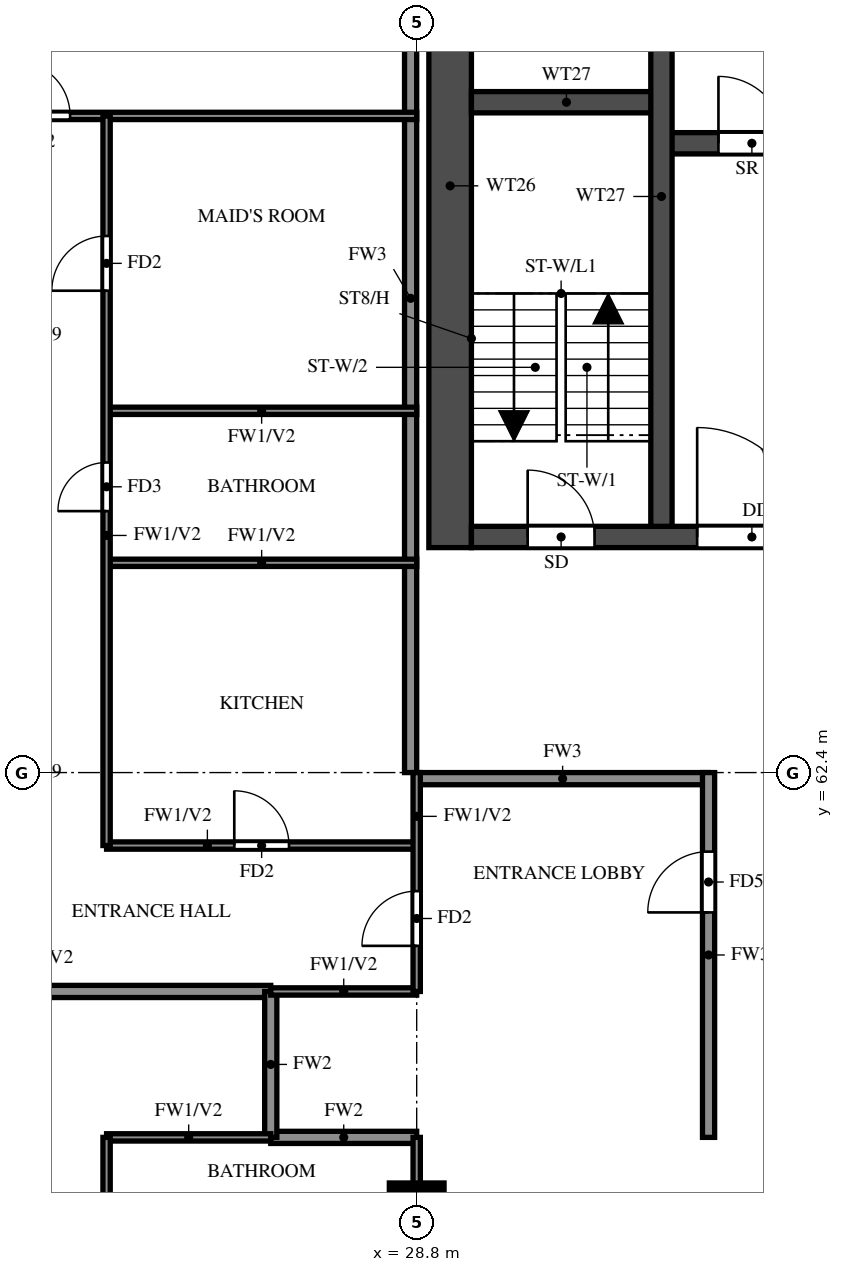
"""IFC4 building model, lengths in metres.
Left out: names, types, materials, properties, quantities, classifications, styles, units other than length and angle.
Written with IfcOpenShell. Run it as: python <this file> out.ifc"""

import sys

from ifc_helpers import new_model, si_unit, direction, frame, frame_2d, origin, origin_2d, place, context, subcontext, project, spatial, rectangle, extrude, source, transform, mapped, element, fill, save


model = new_model("IFC4")
c1 = context("Model", 3, precision=1e-05, world=origin(), true_north=direction((0.0, 1.0)))
c2 = subcontext(c1, "Body", "Model", "MODEL_VIEW")
j1 = project(units=[si_unit("LENGTHUNIT", "METRE"), si_unit("PLANEANGLEUNIT", "RADIAN")], contexts=[c1])
p1 = place(None, origin())
s1 = spatial("IfcSite", under=j1, at=p1, CompositionType="ELEMENT")
p2 = place(p1, origin())
s2 = spatial("IfcBuilding", under=s1, at=p2, CompositionType="ELEMENT")
p3 = place(p2, frame((0.0, 0.0, 192.0)))
s3 = spatial("IfcBuildingStorey", under=s2, at=p3, CompositionType="ELEMENT", Elevation=192.0)
m1 = source(origin(), c2, "Body", "SweptSolid", [
    extrude(rectangle(XDim=0.9, YDim=0.9, at=origin_2d()), origin(), (0.0, 0.0, 1.0), 3.2),
])
p4 = place(p3, frame((28.8, 55.2, 0.0), z_axis=(0.0, 0.0, 1.0), x_axis=(1.0, 0.0, 0.0)))
e1 = element("IfcColumn", 1, at=p4, inside=s3, PredefinedType="COLUMN", context=c2, shape_type="MappedRepresentation", body=[
    mapped(m1, transform((0.0, 0.0, 0.0))),
])
p5 = place(p3, frame((29.35, 66.1, 0.0), z_axis=(0.0, 0.0, 1.0), x_axis=(0.0, 1.0, 0.0)))
e2 = element("IfcWall", 2, at=p5, inside=s3, PredefinedType="SHEAR", context=c2, shape_type="SweptSolid", body=[
    extrude(rectangle(XDim=11.9, YDim=0.7, at=frame_2d((5.95, 0.0))), origin(), (0.0, 0.0, 1.0), 3.2),
])
p6 = place(p3, frame((29.7, 66.275, 0.0), z_axis=(0.0, 0.0, 1.0), x_axis=(1.0, 0.0, 0.0)))
e3 = element("IfcWall", 3, at=p6, inside=s3, PredefinedType="SHEAR", context=c2, shape_type="SweptSolid", body=[
    extrude(rectangle(XDim=41.4, YDim=0.35, at=frame_2d((20.7, 0.0))), origin(), (0.0, 0.0, 1.0), 3.2),
])
p7 = place(p6, frame((0.925, 0.0, 0.0)))
e4 = element("IfcOpeningElement", 4, at=p7, cuts=e3, PredefinedType="OPENING", context=c2, shape_type="SweptSolid", body=[
    extrude(rectangle(XDim=1.1, YDim=2.1, at=frame_2d((0.55, 1.05))), frame((0.0, 0.185, 0.0), z_axis=(0.0, -1.0, 0.0), x_axis=(1.0, 0.0, 0.0)), (0.0, 0.0, 1.0), 0.37),
])
p8 = place(p6, frame((3.712, 0.0, 0.0)))
e5 = element("IfcOpeningElement", 5, at=p8, cuts=e3, PredefinedType="OPENING", context=c2, shape_type="SweptSolid", body=[
    extrude(rectangle(XDim=1.8, YDim=2.1, at=frame_2d((0.9, 1.05))), frame((0.0, 0.185, 0.0), z_axis=(0.0, -1.0, 0.0), x_axis=(1.0, 0.0, 0.0)), (0.0, 0.0, 1.0), 0.37),
])
p9 = place(p3, frame((32.825, 72.75, 0.0), z_axis=(0.0, 0.0, 1.0), x_axis=(1.0, 0.0, 0.0)))
e6 = element("IfcWall", 6, at=p9, inside=s3, PredefinedType="SHEAR", context=c2, shape_type="SweptSolid", body=[
    extrude(rectangle(XDim=35.15, YDim=0.35, at=frame_2d((17.575, 0.0))), origin(), (0.0, 0.0, 1.0), 3.2),
])
p10 = place(p9, frame((19.8, 0.0, 0.0)))
e7 = element("IfcOpeningElement", 7, at=p10, cuts=e6, PredefinedType="OPENING", context=c2, shape_type="SweptSolid", body=[
    extrude(rectangle(XDim=1.1, YDim=2.1, at=frame_2d((0.55, 1.05))), frame((0.0, 0.185, 0.0), z_axis=(0.0, -1.0, 0.0), x_axis=(1.0, 0.0, 0.0)), (0.0, 0.0, 1.0), 0.37),
])
p11 = place(p9, frame((27.7, 0.0, 0.0)))
e8 = element("IfcOpeningElement", 8, at=p11, cuts=e6, PredefinedType="OPENING", context=c2, shape_type="SweptSolid", body=[
    extrude(rectangle(XDim=1.1, YDim=2.1, at=frame_2d((0.55, 1.05))), frame((0.0, 0.185, 0.0), z_axis=(0.0, -1.0, 0.0), x_axis=(1.0, 0.0, 0.0)), (0.0, 0.0, 1.0), 0.37),
])
p12 = place(p9, frame((30.3, 0.0, 0.0)))
e9 = element("IfcOpeningElement", 9, at=p12, cuts=e6, PredefinedType="OPENING", context=c2, shape_type="SweptSolid", body=[
    extrude(rectangle(XDim=1.1, YDim=2.1, at=frame_2d((0.55, 1.05))), frame((0.0, 0.185, 0.0), z_axis=(0.0, -1.0, 0.0), x_axis=(1.0, 0.0, 0.0)), (0.0, 0.0, 1.0), 0.37),
])
p13 = place(p9, frame((3.8, 0.0, 0.0)))
e10 = element("IfcOpeningElement", 10, at=p13, cuts=e6, PredefinedType="OPENING", context=c2, shape_type="SweptSolid", body=[
    extrude(rectangle(XDim=1.1, YDim=2.1, at=frame_2d((0.55, 1.05))), frame((0.0, 0.185, 0.0), z_axis=(0.0, -1.0, 0.0), x_axis=(1.0, 0.0, 0.0)), (0.0, 0.0, 1.0), 0.37),
])
p14 = place(p9, frame((6.55, 0.0, 0.0)))
e11 = element("IfcOpeningElement", 11, at=p14, cuts=e6, PredefinedType="OPENING", context=c2, shape_type="SweptSolid", body=[
    extrude(rectangle(XDim=1.1, YDim=2.1, at=frame_2d((0.55, 1.05))), frame((0.0, 0.185, 0.0), z_axis=(0.0, -1.0, 0.0), x_axis=(1.0, 0.0, 0.0)), (0.0, 0.0, 1.0), 0.37),
])
p15 = place(p9, frame((9.3, 0.0, 0.0)))
e12 = element("IfcOpeningElement", 12, at=p15, cuts=e6, PredefinedType="OPENING", context=c2, shape_type="SweptSolid", body=[
    extrude(rectangle(XDim=1.1, YDim=2.1, at=frame_2d((0.55, 1.05))), frame((0.0, 0.185, 0.0), z_axis=(0.0, -1.0, 0.0), x_axis=(1.0, 0.0, 0.0)), (0.0, 0.0, 1.0), 0.37),
])
p16 = place(p9, frame((12.05, 0.0, 0.0)))
e13 = element("IfcOpeningElement", 13, at=p16, cuts=e6, PredefinedType="OPENING", context=c2, shape_type="SweptSolid", body=[
    extrude(rectangle(XDim=1.1, YDim=2.1, at=frame_2d((0.55, 1.05))), frame((0.0, 0.185, 0.0), z_axis=(0.0, -1.0, 0.0), x_axis=(1.0, 0.0, 0.0)), (0.0, 0.0, 1.0), 0.37),
])
p17 = place(p9, frame((14.8, 0.0, 0.0)))
e14 = element("IfcOpeningElement", 14, at=p17, cuts=e6, PredefinedType="OPENING", context=c2, shape_type="SweptSolid", body=[
    extrude(rectangle(XDim=1.1, YDim=2.1, at=frame_2d((0.55, 1.05))), frame((0.0, 0.185, 0.0), z_axis=(0.0, -1.0, 0.0), x_axis=(1.0, 0.0, 0.0)), (0.0, 0.0, 1.0), 0.37),
])
p18 = place(p9, frame((17.55, 0.0, 0.0)))
e15 = element("IfcOpeningElement", 15, at=p18, cuts=e6, PredefinedType="OPENING", context=c2, shape_type="SweptSolid", body=[
    extrude(rectangle(XDim=1.1, YDim=2.1, at=frame_2d((0.55, 1.05))), frame((0.0, 0.185, 0.0), z_axis=(0.0, -1.0, 0.0), x_axis=(1.0, 0.0, 0.0)), (0.0, 0.0, 1.0), 0.37),
])
p19 = place(p9, frame((0.938, 0.0, 0.0)))
e16 = element("IfcOpeningElement", 16, at=p19, cuts=e6, PredefinedType="OPENING", context=c2, shape_type="SweptSolid", body=[
    extrude(rectangle(XDim=1.1, YDim=2.1, at=frame_2d((0.55, 1.05))), frame((0.0, 0.185, 0.0), z_axis=(0.0, -1.0, 0.0), x_axis=(1.0, 0.0, 0.0)), (0.0, 0.0, 1.0), 0.37),
])
p20 = place(p3, frame((29.7, 73.425, 0.0), z_axis=(0.0, 0.0, 1.0), x_axis=(1.0, 0.0, 0.0)))
e17 = element("IfcWall", 17, at=p20, inside=s3, PredefinedType="SHEAR", context=c2, shape_type="SweptSolid", body=[
    extrude(rectangle(XDim=3.125, YDim=0.35, at=frame_2d((1.562, 0.0))), origin(), (0.0, 0.0, 1.0), 3.2),
])
p21 = place(p3, frame((32.825, 66.45, 0.0), z_axis=(0.0, 0.0, 1.0), x_axis=(0.0, 1.0, 0.0)))
e18 = element("IfcWall", 18, at=p21, inside=s3, PredefinedType="SHEAR", context=c2, shape_type="SweptSolid", body=[
    extrude(rectangle(XDim=10.85, YDim=0.35, at=frame_2d((5.425, 0.0))), origin(), (0.0, 0.0, 1.0), 3.2),
])
p22 = place(p3, frame((28.8, 62.3, 0.0), z_axis=(0.0, 0.0, 1.0), x_axis=(1.0, 0.0, 0.0)))
e19 = element("IfcWall", 19, at=p22, inside=s3, PredefinedType="SOLIDWALL", context=c2, shape_type="SweptSolid", body=[
    extrude(rectangle(XDim=4.8, YDim=0.2, at=frame_2d((2.4, 0.0))), origin(), (0.0, 0.0, 1.0), 3.2),
])
p23 = place(p3, frame((28.7, 62.4, 0.0), z_axis=(0.0, 0.0, 1.0), x_axis=(0.0, 1.0, 0.0)))
e20 = element("IfcWall", 20, at=p23, inside=s3, PredefinedType="SOLIDWALL", context=c2, shape_type="SweptSolid", body=[
    extrude(rectangle(XDim=15.6, YDim=0.2, at=frame_2d((7.8, 0.0))), origin(), (0.0, 0.0, 1.0), 3.2),
])
p24 = place(p3, frame((33.6, 56.4, 0.0), z_axis=(0.0, 0.0, 1.0), x_axis=(0.0, 1.0, 0.0)))
e21 = element("IfcWall", 21, at=p24, inside=s3, PredefinedType="SOLIDWALL", context=c2, shape_type="SweptSolid", body=[
    extrude(rectangle(XDim=6.0, YDim=0.2, at=frame_2d((3.0, 0.0))), origin(), (0.0, 0.0, 1.0), 3.2),
])
p25 = place(p24, frame((3.7, 0.0, 0.0)))
e22 = element("IfcOpeningElement", 22, at=p25, cuts=e21, PredefinedType="OPENING", context=c2, shape_type="SweptSolid", body=[
    extrude(rectangle(XDim=1.0, YDim=2.1, at=frame_2d((0.5, 1.05))), frame((0.0, 0.11, 0.0), z_axis=(0.0, -1.0, 0.0), x_axis=(1.0, 0.0, 0.0)), (0.0, 0.0, 1.0), 0.22),
])
p26 = place(p3, frame((26.4, 56.4, 0.0), z_axis=(0.0, 0.0, 1.0), x_axis=(1.0, 0.0, 0.0)))
e23 = element("IfcWall", 23, at=p26, inside=s3, PredefinedType="SOLIDWALL", context=c2, shape_type="SweptSolid", body=[
    extrude(rectangle(XDim=2.4, YDim=0.2, at=frame_2d((1.2, 0.0))), origin(), (0.0, 0.0, 1.0), 3.2),
])
p27 = place(p3, frame((14.525, 58.8, 0.0), z_axis=(0.0, 0.0, 1.0), x_axis=(1.0, 0.0, 0.0)))
e24 = element("IfcWall", 24, at=p27, inside=s3, PredefinedType="SOLIDWALL", context=c2, shape_type="SweptSolid", body=[
    extrude(rectangle(XDim=11.875, YDim=0.2, at=frame_2d((5.938, 0.0))), origin(), (0.0, 0.0, 1.0), 2.3),
])
p28 = place(p3, frame((26.4, 56.4, 0.0), z_axis=(0.0, 0.0, 1.0), x_axis=(0.0, 1.0, 0.0)))
e25 = element("IfcWall", 25, at=p28, inside=s3, PredefinedType="SOLIDWALL", context=c2, shape_type="SweptSolid", body=[
    extrude(rectangle(XDim=2.4, YDim=0.2, at=frame_2d((1.2, 0.0))), origin(), (0.0, 0.0, 1.0), 3.2),
])
p29 = place(p3, frame((23.7, 56.4, 0.0), z_axis=(0.0, 0.0, 1.0), x_axis=(1.0, 0.0, 0.0)))
e26 = element("IfcWall", 26, at=p29, inside=s3, PredefinedType="PARTITIONING", context=c2, shape_type="SweptSolid", body=[
    extrude(rectangle(XDim=2.7, YDim=0.12, at=frame_2d((1.35, 0.0))), origin(), (0.0, 0.0, 1.0), 3.2),
])
p30 = place(p3, frame((26.4, 58.8, 0.0), z_axis=(0.0, 0.0, 1.0), x_axis=(1.0, 0.0, 0.0)))
e27 = element("IfcWall", 27, at=p30, inside=s3, PredefinedType="PARTITIONING", context=c2, shape_type="SweptSolid", body=[
    extrude(rectangle(XDim=2.4, YDim=0.12, at=frame_2d((1.2, 0.0))), origin(), (0.0, 0.0, 1.0), 3.2),
])
p31 = place(p3, frame((23.7, 61.2, 0.0), z_axis=(0.0, 0.0, 1.0), x_axis=(1.0, 0.0, 0.0)))
e28 = element("IfcWall", 28, at=p31, inside=s3, PredefinedType="PARTITIONING", context=c2, shape_type="SweptSolid", body=[
    extrude(rectangle(XDim=5.1, YDim=0.12, at=frame_2d((2.55, 0.0))), origin(), (0.0, 0.0, 1.0), 3.2),
])
p32 = place(p31, frame((2.1, 0.0, 0.0)))
e29 = element("IfcOpeningElement", 29, at=p32, cuts=e28, PredefinedType="OPENING", context=c2, shape_type="SweptSolid", body=[
    extrude(rectangle(XDim=0.9, YDim=2.1, at=frame_2d((0.45, 1.05))), frame((0.0, 0.07, 0.0), z_axis=(0.0, -1.0, 0.0), x_axis=(1.0, 0.0, 0.0)), (0.0, 0.0, 1.0), 0.14),
])
for number, where, z_axis, x_axis in (
    (30, (23.7, 65.85, 0.0), (0.0, 0.0, 1.0), (1.0, 0.0, 0.0)),
    (31, (23.7, 68.35, 0.0), (0.0, 0.0, 1.0), (1.0, 0.0, 0.0)),
):
    element("IfcWall", number, at=place(p3, frame(where, z_axis=z_axis, x_axis=x_axis)), inside=s3, PredefinedType="PARTITIONING", context=c2, shape_type="SweptSolid", body=[
        extrude(rectangle(XDim=5.1, YDim=0.12, at=frame_2d((2.55, 0.0))), origin(), (0.0, 0.0, 1.0), 3.2),
    ])
p33 = place(p3, frame((14.525, 73.2, 0.0), z_axis=(0.0, 0.0, 1.0), x_axis=(1.0, 0.0, 0.0)))
e32 = element("IfcWall", 32, at=p33, inside=s3, PredefinedType="PARTITIONING", context=c2, shape_type="SweptSolid", body=[
    extrude(rectangle(XDim=14.275, YDim=0.12, at=frame_2d((7.138, 0.0))), origin(), (0.0, 0.0, 1.0), 2.3),
])
p34 = place(p33, frame((7.675, 0.0, 0.0)))
e33 = element("IfcOpeningElement", 33, at=p34, cuts=e32, PredefinedType="OPENING", context=c2, shape_type="SweptSolid", body=[
    extrude(rectangle(XDim=0.9, YDim=2.1, at=frame_2d((0.45, 1.05))), frame((0.0, 0.07, 0.0), z_axis=(0.0, -1.0, 0.0), x_axis=(1.0, 0.0, 0.0)), (0.0, 0.0, 1.0), 0.14),
])
p35 = place(p3, frame((23.7, 54.0, 0.0), z_axis=(0.0, 0.0, 1.0), x_axis=(0.0, 1.0, 0.0)))
e34 = element("IfcWall", 34, at=p35, inside=s3, PredefinedType="PARTITIONING", context=c2, shape_type="SweptSolid", body=[
    extrude(rectangle(XDim=2.4, YDim=0.12, at=frame_2d((1.2, 0.0))), origin(), (0.0, 0.0, 1.0), 3.2),
])
p36 = place(p3, frame((23.7, 61.2, 0.0), z_axis=(0.0, 0.0, 1.0), x_axis=(0.0, 1.0, 0.0)))
e35 = element("IfcWall", 35, at=p36, inside=s3, PredefinedType="PARTITIONING", context=c2, shape_type="SweptSolid", body=[
    extrude(rectangle(XDim=12.0, YDim=0.12, at=frame_2d((6.0, 0.0))), origin(), (0.0, 0.0, 1.0), 3.2),
])
p37 = place(p36, frame((5.5, 0.0, 0.0)))
e36 = element("IfcOpeningElement", 36, at=p37, cuts=e35, PredefinedType="OPENING", context=c2, shape_type="SweptSolid", body=[
    extrude(rectangle(XDim=0.8, YDim=2.1, at=frame_2d((0.4, 1.05))), frame((0.0, 0.07, 0.0), z_axis=(0.0, -1.0, 0.0), x_axis=(1.0, 0.0, 0.0)), (0.0, 0.0, 1.0), 0.14),
])
p38 = place(p36, frame((9.125, 0.0, 0.0)))
e37 = element("IfcOpeningElement", 37, at=p38, cuts=e35, PredefinedType="OPENING", context=c2, shape_type="SweptSolid", body=[
    extrude(rectangle(XDim=0.9, YDim=2.1, at=frame_2d((0.45, 1.05))), frame((0.0, 0.07, 0.0), z_axis=(0.0, -1.0, 0.0), x_axis=(1.0, 0.0, 0.0)), (0.0, 0.0, 1.0), 0.14),
])
p39 = place(p3, frame((28.8, 54.0, 0.0), z_axis=(0.0, 0.0, 1.0), x_axis=(0.0, 1.0, 0.0)))
e38 = element("IfcWall", 38, at=p39, inside=s3, PredefinedType="PARTITIONING", context=c2, shape_type="SweptSolid", body=[
    extrude(rectangle(XDim=2.4, YDim=0.12, at=frame_2d((1.2, 0.0))), origin(), (0.0, 0.0, 1.0), 3.2),
])
p40 = place(p3, frame((28.8, 58.8, 0.0), z_axis=(0.0, 0.0, 1.0), x_axis=(0.0, 1.0, 0.0)))
e39 = element("IfcWall", 39, at=p40, inside=s3, PredefinedType="PARTITIONING", context=c2, shape_type="SweptSolid", body=[
    extrude(rectangle(XDim=3.6, YDim=0.12, at=frame_2d((1.8, 0.0))), origin(), (0.0, 0.0, 1.0), 3.2),
])
p41 = place(p40, frame((0.75, 0.0, 0.0)))
e40 = element("IfcOpeningElement", 40, at=p41, cuts=e39, PredefinedType="OPENING", context=c2, shape_type="SweptSolid", body=[
    extrude(rectangle(XDim=0.9, YDim=2.1, at=frame_2d((0.45, 1.05))), frame((0.0, 0.07, 0.0), z_axis=(0.0, -1.0, 0.0), x_axis=(1.0, 0.0, 0.0)), (0.0, 0.0, 1.0), 0.14),
])
p42 = place(p7, origin())
e41 = element("IfcDoor", 41, at=p42, inside=s3, OperationType="SINGLE_SWING_LEFT", PredefinedType="DOOR", context=c2, shape_type="SweptSolid", body=[
    extrude(rectangle(XDim=1.1, YDim=2.1, at=frame_2d((0.55, 1.05))), frame((0.0, 0.025, 0.0), z_axis=(0.0, -1.0, 0.0), x_axis=(1.0, 0.0, 0.0)), (0.0, 0.0, 1.0), 0.05),
])
fill(e4, e41)
p43 = place(p8, origin())
e42 = element("IfcDoor", 42, at=p43, inside=s3, OperationType="DOUBLE_DOOR_SINGLE_SWING", PredefinedType="DOOR", context=c2, shape_type="SweptSolid", body=[
    extrude(rectangle(XDim=1.8, YDim=2.1, at=frame_2d((0.9, 1.05))), frame((0.0, 0.025, 0.0), z_axis=(0.0, -1.0, 0.0), x_axis=(1.0, 0.0, 0.0)), (0.0, 0.0, 1.0), 0.05),
])
fill(e5, e42)
p44 = place(p19, origin())
e43 = element("IfcDoor", 43, at=p44, inside=s3, OperationType="SINGLE_SWING_LEFT", PredefinedType="DOOR", context=c2, shape_type="SweptSolid", body=[
    extrude(rectangle(XDim=1.1, YDim=2.1, at=frame_2d((0.55, 1.05))), frame((0.0, 0.025, 0.0), z_axis=(0.0, -1.0, 0.0), x_axis=(1.0, 0.0, 0.0)), (0.0, 0.0, 1.0), 0.05),
])
fill(e16, e43)
p45 = place(p41, origin())
e44 = element("IfcDoor", 44, at=p45, inside=s3, OperationType="SINGLE_SWING_LEFT", PredefinedType="DOOR", context=c2, shape_type="SweptSolid", body=[
    extrude(rectangle(XDim=0.9, YDim=2.1, at=frame_2d((0.45, 1.05))), frame((0.0, 0.025, 0.0), z_axis=(0.0, -1.0, 0.0), x_axis=(1.0, 0.0, 0.0)), (0.0, 0.0, 1.0), 0.05),
])
fill(e40, e44)
p46 = place(p25, origin())
e45 = element("IfcDoor", 45, at=p46, inside=s3, OperationType="SINGLE_SWING_RIGHT", PredefinedType="DOOR", context=c2, shape_type="SweptSolid", body=[
    extrude(rectangle(XDim=1.0, YDim=2.1, at=frame_2d((0.5, 1.05))), frame((0.0, 0.025, 0.0), z_axis=(0.0, -1.0, 0.0), x_axis=(1.0, 0.0, 0.0)), (0.0, 0.0, 1.0), 0.05),
])
fill(e22, e45)
p47 = place(p34, origin())
e46 = element("IfcDoor", 46, at=p47, inside=s3, OperationType="SINGLE_SWING_LEFT", PredefinedType="DOOR", context=c2, shape_type="SweptSolid", body=[
    extrude(rectangle(XDim=0.9, YDim=2.1, at=frame_2d((0.45, 1.05))), frame((0.0, 0.025, 0.0), z_axis=(0.0, -1.0, 0.0), x_axis=(1.0, 0.0, 0.0)), (0.0, 0.0, 1.0), 0.05),
])
fill(e33, e46)
p48 = place(p32, origin())
e47 = element("IfcDoor", 47, at=p48, inside=s3, OperationType="SINGLE_SWING_RIGHT", PredefinedType="DOOR", context=c2, shape_type="SweptSolid", body=[
    extrude(rectangle(XDim=0.9, YDim=2.1, at=frame_2d((0.45, 1.05))), frame((0.0, 0.025, 0.0), z_axis=(0.0, -1.0, 0.0), x_axis=(1.0, 0.0, 0.0)), (0.0, 0.0, 1.0), 0.05),
])
fill(e29, e47)
p49 = place(p37, origin())
e48 = element("IfcDoor", 48, at=p49, inside=s3, OperationType="SINGLE_SWING_LEFT", PredefinedType="DOOR", context=c2, shape_type="SweptSolid", body=[
    extrude(rectangle(XDim=0.8, YDim=2.1, at=frame_2d((0.4, 1.05))), frame((0.0, 0.025, 0.0), z_axis=(0.0, -1.0, 0.0), x_axis=(1.0, 0.0, 0.0)), (0.0, 0.0, 1.0), 0.05),
])
fill(e36, e48)
p50 = place(p38, origin())
e49 = element("IfcDoor", 49, at=p50, inside=s3, OperationType="SINGLE_SWING_LEFT", PredefinedType="DOOR", context=c2, shape_type="SweptSolid", body=[
    extrude(rectangle(XDim=0.9, YDim=2.1, at=frame_2d((0.45, 1.05))), frame((0.0, 0.025, 0.0), z_axis=(0.0, -1.0, 0.0), x_axis=(1.0, 0.0, 0.0)), (0.0, 0.0, 1.0), 0.05),
])
fill(e37, e49)
save(model, sys.argv[1])
